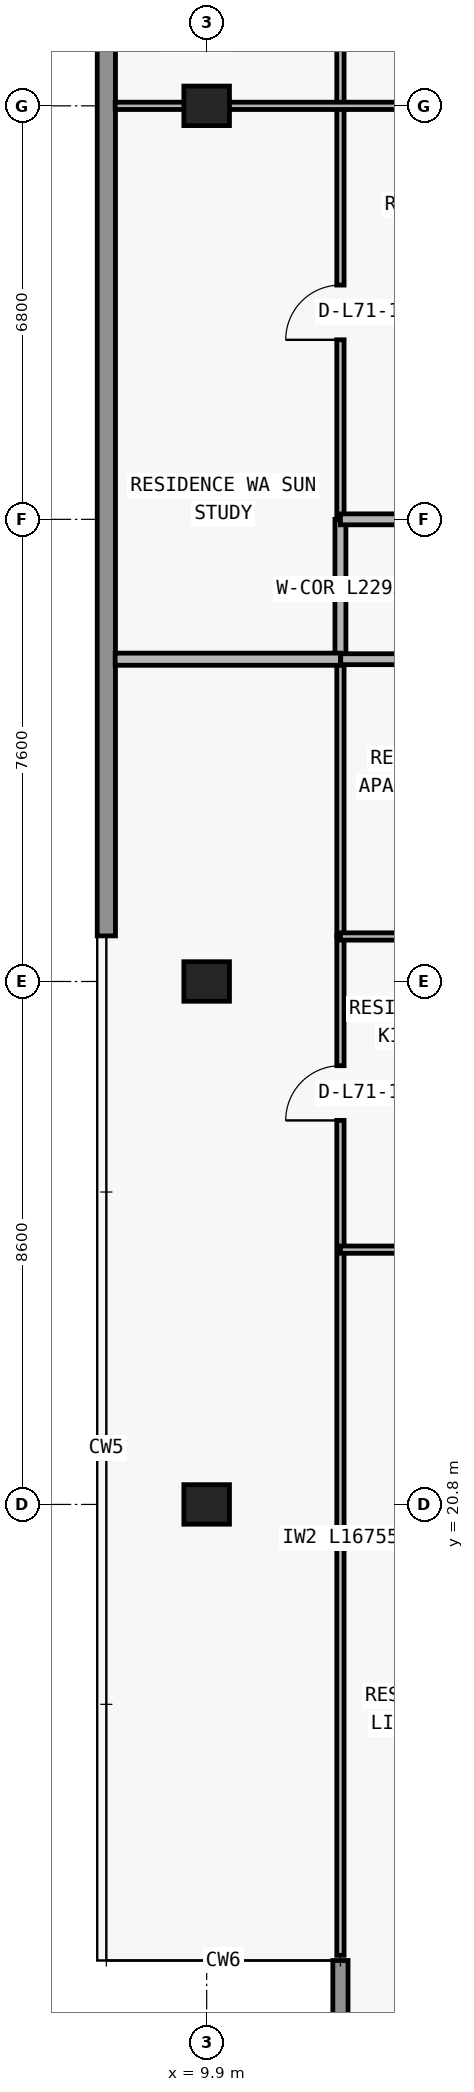
"""IFC4 building model, lengths in metres.
Left out: names, types, materials, properties, quantities, classifications, styles, units other than length and angle.
Written with IfcOpenShell. Run it as: python <this file> out.ifc"""

import sys

from ifc_helpers import new_model, si_unit, direction, frame, frame_2d, origin, origin_2d, place, context, subcontext, project, spatial, rectangle, extrude, element, fill, save


model = new_model("IFC4")
c1 = context("Model", 3, precision=1e-05, world=origin(), true_north=direction((0.0, 1.0)))
c2 = subcontext(c1, "Body", "Model", "MODEL_VIEW")
j1 = project(units=[si_unit("LENGTHUNIT", "METRE"), si_unit("PLANEANGLEUNIT", "RADIAN")], contexts=[c1])
p1 = place(None, origin())
s1 = spatial("IfcSite", under=j1, at=p1, CompositionType="ELEMENT")
p2 = place(p1, origin())
s2 = spatial("IfcBuilding", under=s1, at=p2, CompositionType="ELEMENT")
p3 = place(p2, frame((0.0, 0.0, 252.9)))
s3 = spatial("IfcBuildingStorey", under=s2, at=p3, CompositionType="ELEMENT", Elevation=252.9)
for number, where, z_axis, x_axis in (
    (1, (9.9, 20.8, 0.0), (0.0, 0.0, 1.0), (1.0, 0.0, 0.0)),
    (2, (9.9, 29.4, 0.0), (0.0, 0.0, 1.0), (1.0, 0.0, 0.0)),
    (3, (9.9, 43.8, 0.0), (0.0, 0.0, 1.0), (1.0, 0.0, 0.0)),
):
    element("IfcColumn", number, at=place(p3, frame(where, z_axis=z_axis, x_axis=x_axis)), inside=s3, PredefinedType="COLUMN", context=c2, shape_type="SweptSolid", body=[
        extrude(rectangle(XDim=0.75, YDim=0.65, at=origin_2d()), origin(), (0.0, 0.0, 1.0), 3.05),
    ])
p4 = place(p3, frame((12.1, 13.3, 0.0), z_axis=(0.0, 0.0, 1.0), x_axis=(0.0, -1.0, 0.0)))
e4 = element("IfcWall", 4, at=p4, inside=s3, PredefinedType="ELEMENTEDWALL", context=c2, shape_type="SweptSolid", body=[
    extrude(rectangle(XDim=3.45, YDim=0.25, at=frame_2d((1.725, 0.0))), origin(), (0.0, 0.0, 1.0), 3.05),
])
p5 = place(p3, frame((8.25, 30.15, 0.0), z_axis=(0.0, 0.0, 1.0), x_axis=(0.0, 1.0, 0.0)))
e5 = element("IfcWall", 5, at=p5, inside=s3, PredefinedType="STANDARD", context=c2, shape_type="SweptSolid", body=[
    extrude(rectangle(XDim=16.85, YDim=0.3, at=frame_2d((8.425, 0.0))), origin(), (0.0, 0.0, 1.0), 3.05),
])
p6 = place(p3, frame((12.1, 13.385, 0.0), z_axis=(0.0, 0.0, 1.0), x_axis=(0.0, 1.0, 0.0)))
e6 = element("IfcWall", 6, at=p6, inside=s3, PredefinedType="PARTITIONING", context=c2, shape_type="SweptSolid", body=[
    extrude(rectangle(XDim=16.755, YDim=0.12, at=frame_2d((8.377, 0.0))), origin(), (0.0, 0.0, 1.0), 3.05),
])
p7 = place(p6, frame((13.73, 0.0, 0.0)))
e7 = element("IfcOpeningElement", 7, at=p7, cuts=e6, PredefinedType="OPENING", context=c2, shape_type="SweptSolid", body=[
    extrude(rectangle(XDim=0.9, YDim=2.15, at=frame_2d((0.45, 1.075))), frame((0.0, 0.07, 0.0), z_axis=(0.0, -1.0, 0.0), x_axis=(1.0, 0.0, 0.0)), (0.0, 0.0, 1.0), 0.14),
])
p8 = place(p3, frame((12.1, 30.15, 0.0), z_axis=(0.0, 0.0, 1.0), x_axis=(0.0, 1.0, 0.0)))
e8 = element("IfcWall", 8, at=p8, inside=s3, PredefinedType="PARTITIONING", context=c2, shape_type="SweptSolid", body=[
    extrude(rectangle(XDim=4.55, YDim=0.12, at=frame_2d((2.275, 0.0))), origin(), (0.0, 0.0, 1.0), 3.05),
])
p9 = place(p3, frame((12.1, 34.705, 0.0), z_axis=(0.0, 0.0, 1.0), x_axis=(0.0, 1.0, 0.0)))
e9 = element("IfcWall", 9, at=p9, inside=s3, PredefinedType="PARTITIONING", context=c2, shape_type="SweptSolid", body=[
    extrude(rectangle(XDim=2.295, YDim=0.18, at=frame_2d((1.147, 0.0))), origin(), (0.0, 0.0, 1.0), 3.05),
])
p10 = place(p3, frame((12.1, 37.005, 0.0), z_axis=(0.0, 0.0, 1.0), x_axis=(0.0, 1.0, 0.0)))
e10 = element("IfcWall", 10, at=p10, inside=s3, PredefinedType="PARTITIONING", context=c2, shape_type="SweptSolid", body=[
    extrude(rectangle(XDim=9.875, YDim=0.12, at=frame_2d((4.938, 0.0))), origin(), (0.0, 0.0, 1.0), 3.05),
])
p11 = place(p10, frame((2.948, 0.0, 0.0)))
e11 = element("IfcOpeningElement", 11, at=p11, cuts=e10, PredefinedType="OPENING", context=c2, shape_type="SweptSolid", body=[
    extrude(rectangle(XDim=0.9, YDim=2.15, at=frame_2d((0.45, 1.075))), frame((0.0, 0.07, 0.0), z_axis=(0.0, -1.0, 0.0), x_axis=(1.0, 0.0, 0.0)), (0.0, 0.0, 1.0), 0.14),
])
p12 = place(p10, frame((7.885, 0.0, 0.0)))
e12 = element("IfcOpeningElement", 12, at=p12, cuts=e10, PredefinedType="OPENING", context=c2, shape_type="SweptSolid", body=[
    extrude(rectangle(XDim=0.9, YDim=2.15, at=frame_2d((0.45, 1.075))), frame((0.0, 0.07, 0.0), z_axis=(0.0, -1.0, 0.0), x_axis=(1.0, 0.0, 0.0)), (0.0, 0.0, 1.0), 0.14),
])
p13 = place(p3, frame((12.1, 24.99, 0.0), z_axis=(0.0, 0.0, 1.0), x_axis=(1.0, 0.0, 0.0)))
e13 = element("IfcWall", 13, at=p13, inside=s3, PredefinedType="PARTITIONING", context=c2, shape_type="SweptSolid", body=[
    extrude(rectangle(XDim=6.2, YDim=0.12, at=frame_2d((3.1, 0.0))), origin(), (0.0, 0.0, 1.0), 3.05),
])
p14 = place(p13, frame((1.1, 0.0, 0.0)))
e14 = element("IfcOpeningElement", 14, at=p14, cuts=e13, PredefinedType="OPENING", context=c2, shape_type="SweptSolid", body=[
    extrude(rectangle(XDim=0.9, YDim=2.15, at=frame_2d((0.45, 1.075))), frame((0.0, 0.07, 0.0), z_axis=(0.0, -1.0, 0.0), x_axis=(1.0, 0.0, 0.0)), (0.0, 0.0, 1.0), 0.14),
])
p15 = place(p13, frame((4.324, 0.0, 0.0)))
e15 = element("IfcOpeningElement", 15, at=p15, cuts=e13, PredefinedType="OPENING", context=c2, shape_type="SweptSolid", body=[
    extrude(rectangle(XDim=0.9, YDim=2.15, at=frame_2d((0.45, 1.075))), frame((0.0, 0.07, 0.0), z_axis=(0.0, -1.0, 0.0), x_axis=(1.0, 0.0, 0.0)), (0.0, 0.0, 1.0), 0.14),
])
p16 = place(p3, frame((12.1, 30.14, 0.0), z_axis=(0.0, 0.0, 1.0), x_axis=(1.0, 0.0, 0.0)))
e16 = element("IfcWall", 16, at=p16, inside=s3, PredefinedType="PARTITIONING", context=c2, shape_type="SweptSolid", body=[
    extrude(rectangle(XDim=6.2, YDim=0.12, at=frame_2d((3.1, 0.0))), origin(), (0.0, 0.0, 1.0), 3.05),
])
p17 = place(p16, frame((1.224, 0.0, 0.0)))
e17 = element("IfcOpeningElement", 17, at=p17, cuts=e16, PredefinedType="OPENING", context=c2, shape_type="SweptSolid", body=[
    extrude(rectangle(XDim=0.9, YDim=2.15, at=frame_2d((0.45, 1.075))), frame((0.0, 0.07, 0.0), z_axis=(0.0, -1.0, 0.0), x_axis=(1.0, 0.0, 0.0)), (0.0, 0.0, 1.0), 0.14),
])
p18 = place(p3, frame((8.395, 34.7, 0.0), z_axis=(0.0, 0.0, 1.0), x_axis=(1.0, 0.0, 0.0)))
e18 = element("IfcWall", 18, at=p18, inside=s3, PredefinedType="PARTITIONING", context=c2, shape_type="SweptSolid", body=[
    extrude(rectangle(XDim=3.705, YDim=0.2, at=frame_2d((1.853, 0.0))), origin(), (0.0, 0.0, 1.0), 3.05),
])
p19 = place(p3, frame((12.105, 34.7, 0.0), z_axis=(0.0, 0.0, 1.0), x_axis=(1.0, 0.0, 0.0)))
e19 = element("IfcWall", 19, at=p19, inside=s3, PredefinedType="PARTITIONING", context=c2, shape_type="SweptSolid", body=[
    extrude(rectangle(XDim=14.545, YDim=0.18, at=frame_2d((7.272, 0.0))), origin(), (0.0, 0.0, 1.0), 3.05),
])
p20 = place(p19, frame((1.545, 0.0, 0.0)))
e20 = element("IfcOpeningElement", 20, at=p20, cuts=e19, PredefinedType="OPENING", context=c2, shape_type="SweptSolid", body=[
    extrude(rectangle(XDim=1.0, YDim=2.2, at=frame_2d((0.5, 1.1))), frame((0.0, 0.1, 0.0), z_axis=(0.0, -1.0, 0.0), x_axis=(1.0, 0.0, 0.0)), (0.0, 0.0, 1.0), 0.2),
])
p21 = place(p19, frame((8.691, 0.0, 0.0)))
e21 = element("IfcOpeningElement", 21, at=p21, cuts=e19, PredefinedType="OPENING", context=c2, shape_type="SweptSolid", body=[
    extrude(rectangle(XDim=1.0, YDim=2.2, at=frame_2d((0.5, 1.1))), frame((0.0, 0.1, 0.0), z_axis=(0.0, -1.0, 0.0), x_axis=(1.0, 0.0, 0.0)), (0.0, 0.0, 1.0), 0.2),
])
p22 = place(p3, frame((12.1, 37.0, 0.0), z_axis=(0.0, 0.0, 1.0), x_axis=(1.0, 0.0, 0.0)))
e22 = element("IfcWall", 22, at=p22, inside=s3, PredefinedType="PARTITIONING", context=c2, shape_type="SweptSolid", body=[
    extrude(rectangle(XDim=5.845, YDim=0.18, at=frame_2d((2.922, 0.0))), origin(), (0.0, 0.0, 1.0), 3.05),
])
p23 = place(p22, frame((1.275, 0.0, 0.0)))
e23 = element("IfcOpeningElement", 23, at=p23, cuts=e22, PredefinedType="OPENING", context=c2, shape_type="SweptSolid", body=[
    extrude(rectangle(XDim=1.0, YDim=2.2, at=frame_2d((0.5, 1.1))), frame((0.0, 0.1, 0.0), z_axis=(0.0, -1.0, 0.0), x_axis=(1.0, 0.0, 0.0)), (0.0, 0.0, 1.0), 0.2),
])
p24 = place(p3, frame((8.395, 43.8, 0.0), z_axis=(0.0, 0.0, 1.0), x_axis=(1.0, 0.0, 0.0)))
e24 = element("IfcWall", 24, at=p24, inside=s3, PredefinedType="PARTITIONING", context=c2, shape_type="SweptSolid", body=[
    extrude(rectangle(XDim=9.56, YDim=0.12, at=frame_2d((4.78, 0.0))), origin(), (0.0, 0.0, 1.0), 2.418),
])
p25 = place(p24, frame((5.03, 0.0, 0.0)))
e25 = element("IfcOpeningElement", 25, at=p25, cuts=e24, PredefinedType="OPENING", context=c2, shape_type="SweptSolid", body=[
    extrude(rectangle(XDim=0.9, YDim=2.15, at=frame_2d((0.45, 1.075))), frame((0.0, 0.07, 0.0), z_axis=(0.0, -1.0, 0.0), x_axis=(1.0, 0.0, 0.0)), (0.0, 0.0, 1.0), 0.14),
])
p26 = place(p24, frame((7.982, 0.0, 0.0)))
e26 = element("IfcOpeningElement", 26, at=p26, cuts=e24, PredefinedType="OPENING", context=c2, shape_type="SweptSolid", body=[
    extrude(rectangle(XDim=0.85, YDim=2.1, at=frame_2d((0.425, 1.05))), frame((0.0, 0.07, 0.0), z_axis=(0.0, -1.0, 0.0), x_axis=(1.0, 0.0, 0.0)), (0.0, 0.0, 1.0), 0.14),
])
p27 = place(p7, origin())
e27 = element("IfcDoor", 27, at=p27, inside=s3, OperationType="SINGLE_SWING_LEFT", PredefinedType="DOOR", context=c2, shape_type="SweptSolid", body=[
    extrude(rectangle(XDim=0.9, YDim=2.15, at=frame_2d((0.45, 1.075))), frame((0.0, 0.025, 0.0), z_axis=(0.0, -1.0, 0.0), x_axis=(1.0, 0.0, 0.0)), (0.0, 0.0, 1.0), 0.05),
])
fill(e7, e27)
p28 = place(p11, origin())
e28 = element("IfcDoor", 28, at=p28, inside=s3, OperationType="SINGLE_SWING_LEFT", PredefinedType="DOOR", context=c2, shape_type="SweptSolid", body=[
    extrude(rectangle(XDim=0.9, YDim=2.15, at=frame_2d((0.45, 1.075))), frame((0.0, 0.025, 0.0), z_axis=(0.0, -1.0, 0.0), x_axis=(1.0, 0.0, 0.0)), (0.0, 0.0, 1.0), 0.05),
])
fill(e11, e28)
save(model, sys.argv[1])
